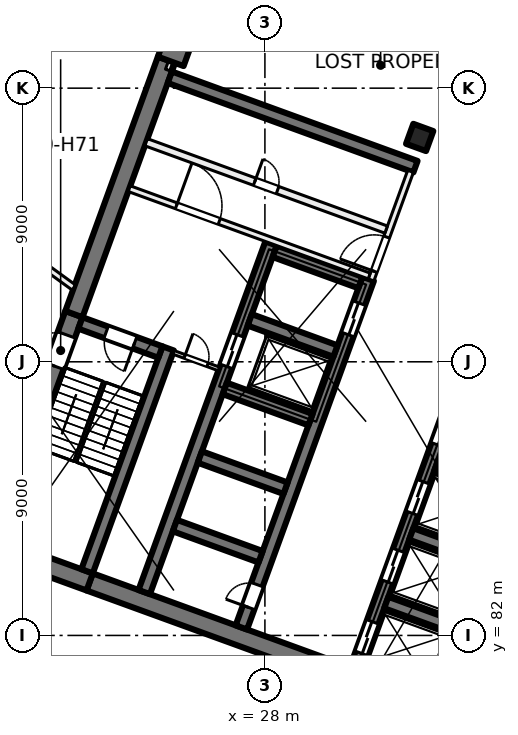
"""IFC4 building model, lengths in metres.
Left out: names, types, materials, properties, quantities, classifications, styles, units other than length and angle.
Written with IfcOpenShell. Run it as: python <this file> out.ifc"""

import sys

from ifc_helpers import new_model, si_unit, direction, frame, frame_2d, origin, origin_2d, place, context, subcontext, project, spatial, rectangle, extrude, element, fill, save


model = new_model("IFC4")
c1 = context("Model", 3, precision=1e-05, world=origin(), true_north=direction((0.0, 1.0)))
c2 = subcontext(c1, "Body", "Model", "MODEL_VIEW")
j1 = project(units=[si_unit("LENGTHUNIT", "METRE"), si_unit("PLANEANGLEUNIT", "RADIAN")], contexts=[c1])
p1 = place(None, origin())
s1 = spatial("IfcSite", under=j1, at=p1, CompositionType="ELEMENT")
p2 = place(p1, origin())
s2 = spatial("IfcBuilding", under=s1, at=p2, CompositionType="ELEMENT")
p3 = place(p2, origin())
s3 = spatial("IfcBuildingStorey", under=s2, at=p3, CompositionType="ELEMENT", Elevation=0.0)
p4 = place(p3, frame((33.091, 98.379, 0.0), z_axis=(0.0, 0.0, 1.0), x_axis=(-0.342020143326, -0.939692620786, 0.0)))
e1 = element("IfcColumn", 1, at=p4, inside=s3, PredefinedType="COLUMN", context=c2, shape_type="SweptSolid", body=[
    extrude(rectangle(XDim=0.7, YDim=0.7, at=origin_2d()), origin(), (0.0, 0.0, 1.0), 7.5),
])
p5 = place(p3, frame((25.056, 101.303, 0.0), z_axis=(0.0, 0.0, 1.0), x_axis=(-0.342020143326, -0.939692620786, 0.0)))
e2 = element("IfcColumn", 2, at=p5, inside=s3, PredefinedType="COLUMN", context=c2, shape_type="SweptSolid", body=[
    extrude(rectangle(XDim=0.9, YDim=0.9, at=origin_2d()), origin(), (0.0, 0.0, 1.0), 7.5),
])
p6 = place(p3, frame((35.767, 78.835, 0.0), z_axis=(0.0, 0.0, 1.0), x_axis=(-0.939692894512, 0.342019391267, 0.0)))
e3 = element("IfcWall", 3, at=p6, inside=s3, PredefinedType="SHEAR", context=c2, shape_type="SweptSolid", body=[
    extrude(rectangle(XDim=14.4, YDim=0.6, at=frame_2d((7.2, 0.0))), origin(), (0.0, 0.0, 1.0), 7.5),
])
p7 = place(p3, frame((22.236, 83.76, 0.0), z_axis=(0.0, 0.0, 1.0), x_axis=(-0.939680822529, 0.342052557032, 0.0)))
e4 = element("IfcWall", 4, at=p7, inside=s3, PredefinedType="SHEAR", context=c2, shape_type="SweptSolid", body=[
    extrude(rectangle(XDim=3.8, YDim=0.6, at=frame_2d((1.9, 0.0))), origin(), (0.0, 0.0, 1.0), 7.5),
])
p8 = place(p3, frame((19.05, 85.239, 0.0), z_axis=(0.0, 0.0, 1.0), x_axis=(0.342016982193, 0.939693771338, 0.0)))
e5 = element("IfcWall", 5, at=p8, inside=s3, PredefinedType="SHEAR", context=c2, shape_type="SweptSolid", body=[
    extrude(rectangle(XDim=7.8, YDim=0.6, at=frame_2d((3.9, 0.0))), origin(), (0.0, 0.0, 1.0), 7.5),
])
p9 = place(p8, frame((5.975, 0.0, 0.0)))
e6 = element("IfcOpeningElement", 6, at=p9, cuts=e5, PredefinedType="OPENING", context=c2, shape_type="SweptSolid", body=[
    extrude(rectangle(XDim=1.1, YDim=2.1, at=frame_2d((0.55, 1.05))), frame((0.0, 0.31, 0.0), z_axis=(0.0, -1.0, 0.0), x_axis=(1.0, 0.0, 0.0)), (0.0, 0.0, 1.0), 0.62),
])
p10 = place(p3, frame((21.717, 92.568, 0.0), z_axis=(0.0, 0.0, 1.0), x_axis=(0.342016162452, 0.939694069696, 0.0)))
e7 = element("IfcWall", 7, at=p10, inside=s3, PredefinedType="SHEAR", context=c2, shape_type="SweptSolid", body=[
    extrude(rectangle(XDim=8.9, YDim=0.6, at=frame_2d((4.45, 0.0))), origin(), (0.0, 0.0, 1.0), 7.5),
])
p11 = place(p3, frame((22.15, 84.11, 0.0), z_axis=(0.0, 0.0, 1.0), x_axis=(0.342016982193, 0.939693771338, 0.0)))
e8 = element("IfcWall", 8, at=p11, inside=s3, PredefinedType="SHEAR", context=c2, shape_type="SweptSolid", body=[
    extrude(rectangle(XDim=7.8, YDim=0.4, at=frame_2d((3.9, 0.0))), origin(), (0.0, 0.0, 1.0), 7.5),
])
p12 = place(p3, frame((24.562, 91.32, 0.0), z_axis=(0.0, 0.0, 1.0), x_axis=(-0.939717030584, 0.341953070509, 0.0)))
e9 = element("IfcWall", 9, at=p12, inside=s3, PredefinedType="SHEAR", context=c2, shape_type="SweptSolid", body=[
    extrude(rectangle(XDim=2.8, YDim=0.4, at=frame_2d((1.4, 0.0))), origin(), (0.0, 0.0, 1.0), 7.5),
])
p13 = place(p12, frame((0.9, 0.0, 0.0)))
e10 = element("IfcOpeningElement", 10, at=p13, cuts=e9, PredefinedType="OPENING", context=c2, shape_type="SweptSolid", body=[
    extrude(rectangle(XDim=1.0, YDim=2.1, at=frame_2d((0.5, 1.05))), frame((0.0, 0.21, 0.0), z_axis=(0.0, -1.0, 0.0), x_axis=(1.0, 0.0, 0.0)), (0.0, 0.0, 1.0), 0.42),
])
p14 = place(p3, frame((30.984, 80.895, 0.0), z_axis=(0.0, 0.0, 1.0), x_axis=(0.342021021735, 0.939692301071, 0.0)))
e11 = element("IfcWall", 11, at=p14, inside=s3, PredefinedType="SHEAR", context=c2, shape_type="SweptSolid", body=[
    extrude(rectangle(XDim=12.2, YDim=0.4, at=frame_2d((6.1, 0.0))), origin(), (0.0, 0.0, 1.0), 7.5),
])
p15 = place(p14, frame((0.55, 0.0, 0.0)))
e12 = element("IfcOpeningElement", 12, at=p15, cuts=e11, PredefinedType="OPENING", context=c2, shape_type="SweptSolid", body=[
    extrude(rectangle(XDim=1.1, YDim=2.1, at=frame_2d((0.55, 1.05))), frame((0.0, 0.21, 0.0), z_axis=(0.0, -1.0, 0.0), x_axis=(1.0, 0.0, 0.0)), (0.0, 0.0, 1.0), 0.42),
])
p16 = place(p14, frame((3.05, 0.0, 0.0)))
e13 = element("IfcOpeningElement", 13, at=p16, cuts=e11, PredefinedType="OPENING", context=c2, shape_type="SweptSolid", body=[
    extrude(rectangle(XDim=1.1, YDim=2.1, at=frame_2d((0.55, 1.05))), frame((0.0, 0.21, 0.0), z_axis=(0.0, -1.0, 0.0), x_axis=(1.0, 0.0, 0.0)), (0.0, 0.0, 1.0), 0.42),
])
p17 = place(p14, frame((5.45, 0.0, 0.0)))
e14 = element("IfcOpeningElement", 14, at=p17, cuts=e11, PredefinedType="OPENING", context=c2, shape_type="SweptSolid", body=[
    extrude(rectangle(XDim=1.1, YDim=2.1, at=frame_2d((0.55, 1.05))), frame((0.0, 0.21, 0.0), z_axis=(0.0, -1.0, 0.0), x_axis=(1.0, 0.0, 0.0)), (0.0, 0.0, 1.0), 0.42),
])
p18 = place(p14, frame((7.85, 0.0, 0.0)))
e15 = element("IfcOpeningElement", 15, at=p18, cuts=e11, PredefinedType="OPENING", context=c2, shape_type="SweptSolid", body=[
    extrude(rectangle(XDim=1.1, YDim=2.1, at=frame_2d((0.55, 1.05))), frame((0.0, 0.21, 0.0), z_axis=(0.0, -1.0, 0.0), x_axis=(1.0, 0.0, 0.0)), (0.0, 0.0, 1.0), 0.42),
])
p19 = place(p14, frame((10.25, 0.0, 0.0)))
e16 = element("IfcOpeningElement", 16, at=p19, cuts=e11, PredefinedType="OPENING", context=c2, shape_type="SweptSolid", body=[
    extrude(rectangle(XDim=1.1, YDim=2.1, at=frame_2d((0.55, 1.05))), frame((0.0, 0.21, 0.0), z_axis=(0.0, -1.0, 0.0), x_axis=(1.0, 0.0, 0.0)), (0.0, 0.0, 1.0), 0.42),
])
for number, where, z_axis, x_axis in (
    (17, (34.812, 82.056, 0.0), (0.0, 0.0, 1.0), (-0.94, 0.342, 0.0)),
    (18, (35.632, 84.311, 0.0), (0.0, 0.0, 1.0), (-0.94, 0.342, 0.0)),
    (19, (36.453, 86.566, 0.0), (0.0, 0.0, 1.0), (-0.94, 0.342, 0.0)),
):
    element("IfcWall", number, at=place(p3, frame(where, z_axis=z_axis, x_axis=x_axis)), inside=s3, PredefinedType="SHEAR", context=c2, shape_type="SweptSolid", body=[
        extrude(rectangle(XDim=3.0, YDim=0.4, at=frame_2d((1.5, 0.0))), origin(), (0.0, 0.0, 1.0), 7.5),
    ])
p20 = place(p3, frame((27.225, 82.263, 0.0), z_axis=(0.0, 0.0, 1.0), x_axis=(0.342014590177, 0.939694641948, 0.0)))
e20 = element("IfcWall", 20, at=p20, inside=s3, PredefinedType="SHEAR", context=c2, shape_type="SweptSolid", body=[
    extrude(rectangle(XDim=12.2, YDim=0.4, at=frame_2d((6.1, 0.0))), origin(), (0.0, 0.0, 1.0), 7.5),
])
p21 = place(p20, frame((10.25, 0.0, 0.0)))
e21 = element("IfcOpeningElement", 21, at=p21, cuts=e20, PredefinedType="OPENING", context=c2, shape_type="SweptSolid", body=[
    extrude(rectangle(XDim=1.1, YDim=2.1, at=frame_2d((0.55, 1.05))), frame((0.0, 0.21, 0.0), z_axis=(0.0, -1.0, 0.0), x_axis=(1.0, 0.0, 0.0)), (0.0, 0.0, 1.0), 0.42),
])
p22 = place(p20, frame((0.7, 0.0, 0.0)))
e22 = element("IfcOpeningElement", 22, at=p22, cuts=e20, PredefinedType="OPENING", context=c2, shape_type="SweptSolid", body=[
    extrude(rectangle(XDim=0.8, YDim=2.1, at=frame_2d((0.4, 1.05))), frame((0.0, 0.21, 0.0), z_axis=(0.0, -1.0, 0.0), x_axis=(1.0, 0.0, 0.0)), (0.0, 0.0, 1.0), 0.42),
])
p23 = place(p3, frame((24.03, 83.426, 0.0), z_axis=(0.0, 0.0, 1.0), x_axis=(0.342014590177, 0.939694641948, 0.0)))
e23 = element("IfcWall", 23, at=p23, inside=s3, PredefinedType="SHEAR", context=c2, shape_type="SweptSolid", body=[
    extrude(rectangle(XDim=12.2, YDim=0.4, at=frame_2d((6.1, 0.0))), origin(), (0.0, 0.0, 1.0), 7.5),
])
p24 = place(p23, frame((7.9, 0.0, 0.0)))
e24 = element("IfcOpeningElement", 24, at=p24, cuts=e23, PredefinedType="OPENING", context=c2, shape_type="SweptSolid", body=[
    extrude(rectangle(XDim=1.1, YDim=2.1, at=frame_2d((0.55, 1.05))), frame((0.0, 0.21, 0.0), z_axis=(0.0, -1.0, 0.0), x_axis=(1.0, 0.0, 0.0)), (0.0, 0.0, 1.0), 0.42),
])
p25 = place(p3, frame((27.858, 84.587, 0.0), z_axis=(0.0, 0.0, 1.0), x_axis=(-0.939686455819, 0.342037080957, 0.0)))
e25 = element("IfcWall", 25, at=p25, inside=s3, PredefinedType="SHEAR", context=c2, shape_type="SweptSolid", body=[
    extrude(rectangle(XDim=3.0, YDim=0.4, at=frame_2d((1.5, 0.0))), origin(), (0.0, 0.0, 1.0), 7.5),
])
p26 = place(p3, frame((28.678, 86.842, 0.0), z_axis=(0.0, 0.0, 1.0), x_axis=(-0.939676934218, 0.342063238742, 0.0)))
e26 = element("IfcWall", 26, at=p26, inside=s3, PredefinedType="SHEAR", context=c2, shape_type="SweptSolid", body=[
    extrude(rectangle(XDim=3.0, YDim=0.4, at=frame_2d((1.5, 0.0))), origin(), (0.0, 0.0, 1.0), 7.5),
])
for number, where, z_axis, x_axis in (
    (27, (29.5, 89.097, 0.0), (0.0, 0.0, 1.0), (-0.94, 0.342, 0.0)),
    (28, (30.32, 91.353, 0.0), (0.0, 0.0, 1.0), (-0.94, 0.342, 0.0)),
    (29, (31.141, 93.608, 0.0), (0.0, 0.0, 1.0), (-0.94, 0.342, 0.0)),
):
    element("IfcWall", number, at=place(p3, frame(where, z_axis=z_axis, x_axis=x_axis)), inside=s3, PredefinedType="SHEAR", context=c2, shape_type="SweptSolid", body=[
        extrude(rectangle(XDim=3.0, YDim=0.4, at=frame_2d((1.5, 0.0))), origin(), (0.0, 0.0, 1.0), 7.5),
    ])
p27 = place(p3, frame((32.953, 97.418, 0.0), z_axis=(0.0, 0.0, 1.0), x_axis=(-0.93969060187, 0.342025690201, 0.0)))
e30 = element("IfcWall", 30, at=p27, inside=s3, PredefinedType="SHEAR", context=c2, shape_type="SweptSolid", body=[
    extrude(rectangle(XDim=8.6, YDim=0.4, at=frame_2d((4.3, 0.0))), origin(), (0.0, 0.0, 1.0), 7.5),
])
p28 = place(p3, frame((12.199, 89.809, 0.0), z_axis=(0.0, 0.0, 1.0), x_axis=(0.342022998908, 0.939691581434, 0.0)))
e31 = element("IfcWall", 31, at=p28, inside=s3, PredefinedType="SOLIDWALL", context=c2, shape_type="SweptSolid", body=[
    extrude(rectangle(XDim=47.334, YDim=0.6, at=frame_2d((23.667, 0.0))), origin(), (0.0, 0.0, 1.0), 7.1),
])
p29 = place(p28, frame((1.523, 0.0, 0.0)))
e32 = element("IfcOpeningElement", 32, at=p29, cuts=e31, PredefinedType="OPENING", context=c2, shape_type="SweptSolid", body=[
    extrude(rectangle(XDim=1.2, YDim=2.4, at=frame_2d((0.6, 1.2))), frame((0.0, 0.31, 0.0), z_axis=(0.0, -1.0, 0.0), x_axis=(1.0, 0.0, 0.0)), (0.0, 0.0, 1.0), 0.62),
])
p30 = place(p28, frame((5.829, 0.0, 0.0)))
e33 = element("IfcOpeningElement", 33, at=p30, cuts=e31, PredefinedType="OPENING", context=c2, shape_type="SweptSolid", body=[
    extrude(rectangle(XDim=1.2, YDim=2.4, at=frame_2d((0.6, 1.2))), frame((0.0, 0.31, 0.0), z_axis=(0.0, -1.0, 0.0), x_axis=(1.0, 0.0, 0.0)), (0.0, 0.0, 1.0), 0.62),
])
p31 = place(p28, frame((9.235, 0.0, 0.9)))
e34 = element("IfcOpeningElement", 34, at=p31, cuts=e31, PredefinedType="OPENING", context=c2, shape_type="SweptSolid", body=[
    extrude(rectangle(XDim=3.0, YDim=4.2, at=frame_2d((1.5, 2.1))), frame((0.0, 0.31, 0.0), z_axis=(0.0, -1.0, 0.0), x_axis=(1.0, 0.0, 0.0)), (0.0, 0.0, 1.0), 0.62),
])
p32 = place(p28, frame((13.99, 0.0, 0.9)))
e35 = element("IfcOpeningElement", 35, at=p32, cuts=e31, PredefinedType="OPENING", context=c2, shape_type="SweptSolid", body=[
    extrude(rectangle(XDim=3.0, YDim=4.2, at=frame_2d((1.5, 2.1))), frame((0.0, 0.31, 0.0), z_axis=(0.0, -1.0, 0.0), x_axis=(1.0, 0.0, 0.0)), (0.0, 0.0, 1.0), 0.62),
])
p33 = place(p28, frame((17.846, 0.0, 0.9)))
e36 = element("IfcOpeningElement", 36, at=p33, cuts=e31, PredefinedType="OPENING", context=c2, shape_type="SweptSolid", body=[
    extrude(rectangle(XDim=3.0, YDim=4.2, at=frame_2d((1.5, 2.1))), frame((0.0, 0.31, 0.0), z_axis=(0.0, -1.0, 0.0), x_axis=(1.0, 0.0, 0.0)), (0.0, 0.0, 1.0), 0.62),
])
p34 = place(p28, frame((22.452, 0.0, 0.9)))
e37 = element("IfcOpeningElement", 37, at=p34, cuts=e31, PredefinedType="OPENING", context=c2, shape_type="SweptSolid", body=[
    extrude(rectangle(XDim=3.0, YDim=4.2, at=frame_2d((1.5, 2.1))), frame((0.0, 0.31, 0.0), z_axis=(0.0, -1.0, 0.0), x_axis=(1.0, 0.0, 0.0)), (0.0, 0.0, 1.0), 0.62),
])
p35 = place(p28, frame((26.458, 0.0, 0.9)))
e38 = element("IfcOpeningElement", 38, at=p35, cuts=e31, PredefinedType="OPENING", context=c2, shape_type="SweptSolid", body=[
    extrude(rectangle(XDim=3.0, YDim=4.2, at=frame_2d((1.5, 2.1))), frame((0.0, 0.31, 0.0), z_axis=(0.0, -1.0, 0.0), x_axis=(1.0, 0.0, 0.0)), (0.0, 0.0, 1.0), 0.62),
])
p36 = place(p28, frame((31.064, 0.0, 0.9)))
e39 = element("IfcOpeningElement", 39, at=p36, cuts=e31, PredefinedType="OPENING", context=c2, shape_type="SweptSolid", body=[
    extrude(rectangle(XDim=3.0, YDim=4.2, at=frame_2d((1.5, 2.1))), frame((0.0, 0.31, 0.0), z_axis=(0.0, -1.0, 0.0), x_axis=(1.0, 0.0, 0.0)), (0.0, 0.0, 1.0), 0.62),
])
p37 = place(p28, frame((36.029, 0.0, 0.9)))
e40 = element("IfcOpeningElement", 40, at=p37, cuts=e31, PredefinedType="OPENING", context=c2, shape_type="SweptSolid", body=[
    extrude(rectangle(XDim=1.2, YDim=4.2, at=frame_2d((0.6, 2.1))), frame((0.0, 0.31, 0.0), z_axis=(0.0, -1.0, 0.0), x_axis=(1.0, 0.0, 0.0)), (0.0, 0.0, 1.0), 0.62),
])
p38 = place(p28, frame((39.676, 0.0, 0.9)))
e41 = element("IfcOpeningElement", 41, at=p38, cuts=e31, PredefinedType="OPENING", context=c2, shape_type="SweptSolid", body=[
    extrude(rectangle(XDim=3.0, YDim=4.2, at=frame_2d((1.5, 2.1))), frame((0.0, 0.31, 0.0), z_axis=(0.0, -1.0, 0.0), x_axis=(1.0, 0.0, 0.0)), (0.0, 0.0, 1.0), 0.62),
])
p39 = place(p28, frame((43.531, 0.0, 0.9)))
e42 = element("IfcOpeningElement", 42, at=p39, cuts=e31, PredefinedType="OPENING", context=c2, shape_type="SweptSolid", body=[
    extrude(rectangle(XDim=3.0, YDim=4.2, at=frame_2d((1.5, 2.1))), frame((0.0, 0.31, 0.0), z_axis=(0.0, -1.0, 0.0), x_axis=(1.0, 0.0, 0.0)), (0.0, 0.0, 1.0), 0.62),
])
p40 = place(p3, frame((31.491, 93.693, 0.0), z_axis=(0.0, 0.0, 1.0), x_axis=(0.341995824804, 0.939701471648, 0.0)))
e43 = element("IfcWall", 43, at=p40, inside=s3, PredefinedType="PARTITIONING", context=c2, shape_type="SweptSolid", body=[
    extrude(rectangle(XDim=3.8, YDim=0.2, at=frame_2d((1.9, 0.0))), origin(), (0.0, 0.0, 1.0), 7.1),
])
p41 = place(p40, frame((0.3, 0.0, 0.0)))
e44 = element("IfcOpeningElement", 44, at=p41, cuts=e43, PredefinedType="OPENING", context=c2, shape_type="SweptSolid", body=[
    extrude(rectangle(XDim=1.2, YDim=2.1, at=frame_2d((0.6, 1.05))), frame((0.0, 0.11, 0.0), z_axis=(0.0, -1.0, 0.0), x_axis=(1.0, 0.0, 0.0)), (0.0, 0.0, 1.0), 0.22),
])
p42 = place(p3, frame((23.538, 96.694, 0.0), z_axis=(0.0, 0.0, 1.0), x_axis=(0.939691552312, -0.342023078919, 0.0)))
e45 = element("IfcWall", 45, at=p42, inside=s3, PredefinedType="PARTITIONING", context=c2, shape_type="SweptSolid", body=[
    extrude(rectangle(XDim=8.4, YDim=0.2, at=frame_2d((4.2, 0.0))), origin(), (0.0, 0.0, 1.0), 7.1),
])
p43 = place(p42, frame((1.65, 0.0, 0.0)))
e46 = element("IfcOpeningElement", 46, at=p43, cuts=e45, PredefinedType="OPENING", context=c2, shape_type="SweptSolid", body=[
    extrude(rectangle(XDim=1.5, YDim=2.1, at=frame_2d((0.75, 1.05))), frame((0.0, 0.11, 0.0), z_axis=(0.0, -1.0, 0.0), x_axis=(1.0, 0.0, 0.0)), (0.0, 0.0, 1.0), 0.22),
])
p44 = place(p3, frame((24.094, 98.221, 0.0), z_axis=(0.0, 0.0, 1.0), x_axis=(0.939691552312, -0.342023078919, 0.0)))
e47 = element("IfcWall", 47, at=p44, inside=s3, PredefinedType="PARTITIONING", context=c2, shape_type="SweptSolid", body=[
    extrude(rectangle(XDim=8.4, YDim=0.25, at=frame_2d((4.2, 0.0))), origin(), (0.0, 0.0, 1.0), 7.1),
])
p45 = place(p44, frame((3.8, 0.0, 0.0)))
e48 = element("IfcOpeningElement", 48, at=p45, cuts=e47, PredefinedType="OPENING", context=c2, shape_type="SweptSolid", body=[
    extrude(rectangle(XDim=0.8, YDim=2.1, at=frame_2d((0.4, 1.05))), frame((0.0, 0.135, 0.0), z_axis=(0.0, -1.0, 0.0), x_axis=(1.0, 0.0, 0.0)), (0.0, 0.0, 1.0), 0.27),
])
p46 = place(p3, frame((24.985, 91.312, 0.0), z_axis=(0.0, 0.0, 1.0), x_axis=(0.939708740826, -0.341975850632, 0.0)))
e49 = element("IfcWall", 49, at=p46, inside=s3, PredefinedType="PARTITIONING", context=c2, shape_type="SweptSolid", body=[
    extrude(rectangle(XDim=1.6, YDim=0.125, at=frame_2d((0.8, 0.0))), origin(), (0.0, 0.0, 1.0), 7.1),
])
p47 = place(p46, frame((0.4, 0.0, 0.0)))
e50 = element("IfcOpeningElement", 50, at=p47, cuts=e49, PredefinedType="OPENING", context=c2, shape_type="SweptSolid", body=[
    extrude(rectangle(XDim=0.8, YDim=2.1, at=frame_2d((0.4, 1.05))), frame((0.0, 0.073, 0.0), z_axis=(0.0, -1.0, 0.0), x_axis=(1.0, 0.0, 0.0)), (0.0, 0.0, 1.0), 0.145),
])
p48 = place(p3, frame((15.488, 97.968, 0.0), z_axis=(0.0, 0.0, 1.0), x_axis=(0.809018500784, -0.587783178892, 0.0)))
e51 = element("IfcWall", 51, at=p48, inside=s3, PredefinedType="PARTITIONING", context=c2, shape_type="SweptSolid", body=[
    extrude(rectangle(XDim=7.698, YDim=0.2, at=frame_2d((3.849, 0.0))), origin(), (0.0, 0.0, 1.0), 7.1),
])
p49 = place(p3, frame((24.8, 100.598, 0.0), z_axis=(0.0, 0.0, 1.0), x_axis=(0.341943433621, 0.93972053729, 0.0)))
e52 = element("IfcWall", 52, at=p49, inside=s3, PredefinedType="PARTITIONING", context=c2, shape_type="SweptSolid", body=[
    extrude(rectangle(XDim=11.25, YDim=0.15, at=frame_2d((5.625, 0.0))), origin(), (0.0, 0.0, 1.0), 7.1),
])
p50 = place(p21, origin())
e53 = element("IfcDoor", 53, at=p50, inside=s3, OperationType="DOUBLE_DOOR_SLIDING", PredefinedType="DOOR", context=c2, shape_type="SweptSolid", body=[
    extrude(rectangle(XDim=1.1, YDim=2.1, at=frame_2d((0.55, 1.05))), frame((0.0, 0.025, 0.0), z_axis=(0.0, -1.0, 0.0), x_axis=(1.0, 0.0, 0.0)), (0.0, 0.0, 1.0), 0.05),
])
fill(e21, e53)
p51 = place(p15, origin())
e54 = element("IfcDoor", 54, at=p51, inside=s3, OperationType="DOUBLE_DOOR_SLIDING", PredefinedType="DOOR", context=c2, shape_type="SweptSolid", body=[
    extrude(rectangle(XDim=1.1, YDim=2.1, at=frame_2d((0.55, 1.05))), frame((0.0, 0.025, 0.0), z_axis=(0.0, -1.0, 0.0), x_axis=(1.0, 0.0, 0.0)), (0.0, 0.0, 1.0), 0.05),
])
fill(e12, e54)
p52 = place(p16, origin())
e55 = element("IfcDoor", 55, at=p52, inside=s3, OperationType="DOUBLE_DOOR_SLIDING", PredefinedType="DOOR", context=c2, shape_type="SweptSolid", body=[
    extrude(rectangle(XDim=1.1, YDim=2.1, at=frame_2d((0.55, 1.05))), frame((0.0, 0.025, 0.0), z_axis=(0.0, -1.0, 0.0), x_axis=(1.0, 0.0, 0.0)), (0.0, 0.0, 1.0), 0.05),
])
fill(e13, e55)
p53 = place(p17, origin())
e56 = element("IfcDoor", 56, at=p53, inside=s3, OperationType="DOUBLE_DOOR_SLIDING", PredefinedType="DOOR", context=c2, shape_type="SweptSolid", body=[
    extrude(rectangle(XDim=1.1, YDim=2.1, at=frame_2d((0.55, 1.05))), frame((0.0, 0.025, 0.0), z_axis=(0.0, -1.0, 0.0), x_axis=(1.0, 0.0, 0.0)), (0.0, 0.0, 1.0), 0.05),
])
fill(e14, e56)
p54 = place(p18, origin())
e57 = element("IfcDoor", 57, at=p54, inside=s3, OperationType="DOUBLE_DOOR_SLIDING", PredefinedType="DOOR", context=c2, shape_type="SweptSolid", body=[
    extrude(rectangle(XDim=1.1, YDim=2.1, at=frame_2d((0.55, 1.05))), frame((0.0, 0.025, 0.0), z_axis=(0.0, -1.0, 0.0), x_axis=(1.0, 0.0, 0.0)), (0.0, 0.0, 1.0), 0.05),
])
fill(e15, e57)
p55 = place(p22, origin())
e58 = element("IfcDoor", 58, at=p55, inside=s3, OperationType="SINGLE_SWING_LEFT", PredefinedType="DOOR", context=c2, shape_type="SweptSolid", body=[
    extrude(rectangle(XDim=0.8, YDim=2.1, at=frame_2d((0.4, 1.05))), frame((0.0, 0.025, 0.0), z_axis=(0.0, -1.0, 0.0), x_axis=(1.0, 0.0, 0.0)), (0.0, 0.0, 1.0), 0.05),
])
fill(e22, e58)
p56 = place(p41, origin())
e59 = element("IfcDoor", 59, at=p56, inside=s3, OperationType="DOUBLE_DOOR_SINGLE_SWING", PredefinedType="DOOR", context=c2, shape_type="SweptSolid", body=[
    extrude(rectangle(XDim=1.2, YDim=2.1, at=frame_2d((0.6, 1.05))), frame((0.0, 0.025, 0.0), z_axis=(0.0, -1.0, 0.0), x_axis=(1.0, 0.0, 0.0)), (0.0, 0.0, 1.0), 0.05),
])
fill(e44, e59)
p57 = place(p43, origin())
e60 = element("IfcDoor", 60, at=p57, inside=s3, OperationType="DOUBLE_DOOR_SINGLE_SWING", PredefinedType="DOOR", context=c2, shape_type="SweptSolid", body=[
    extrude(rectangle(XDim=1.5, YDim=2.1, at=frame_2d((0.75, 1.05))), frame((0.0, 0.025, 0.0), z_axis=(0.0, -1.0, 0.0), x_axis=(1.0, 0.0, 0.0)), (0.0, 0.0, 1.0), 0.05),
])
fill(e46, e60)
p58 = place(p13, origin())
e61 = element("IfcDoor", 61, at=p58, inside=s3, OperationType="SINGLE_SWING_LEFT", PredefinedType="DOOR", context=c2, shape_type="SweptSolid", body=[
    extrude(rectangle(XDim=1.0, YDim=2.1, at=frame_2d((0.5, 1.05))), frame((0.0, 0.025, 0.0), z_axis=(0.0, -1.0, 0.0), x_axis=(1.0, 0.0, 0.0)), (0.0, 0.0, 1.0), 0.05),
])
fill(e10, e61)
p59 = place(p47, origin())
e62 = element("IfcDoor", 62, at=p59, inside=s3, OperationType="SINGLE_SWING_RIGHT", PredefinedType="DOOR", context=c2, shape_type="SweptSolid", body=[
    extrude(rectangle(XDim=0.8, YDim=2.1, at=frame_2d((0.4, 1.05))), frame((0.0, 0.025, 0.0), z_axis=(0.0, -1.0, 0.0), x_axis=(1.0, 0.0, 0.0)), (0.0, 0.0, 1.0), 0.05),
])
fill(e50, e62)
p60 = place(p45, origin())
e63 = element("IfcDoor", 63, at=p60, inside=s3, OperationType="SINGLE_SWING_LEFT", PredefinedType="DOOR", context=c2, shape_type="SweptSolid", body=[
    extrude(rectangle(XDim=0.8, YDim=2.1, at=frame_2d((0.4, 1.05))), frame((0.0, 0.025, 0.0), z_axis=(0.0, -1.0, 0.0), x_axis=(1.0, 0.0, 0.0)), (0.0, 0.0, 1.0), 0.05),
])
fill(e48, e63)
p61 = place(p24, origin())
e64 = element("IfcDoor", 64, at=p61, inside=s3, OperationType="DOUBLE_DOOR_SLIDING", PredefinedType="DOOR", context=c2, shape_type="SweptSolid", body=[
    extrude(rectangle(XDim=1.1, YDim=2.1, at=frame_2d((0.55, 1.05))), frame((0.0, 0.025, 0.0), z_axis=(0.0, -1.0, 0.0), x_axis=(1.0, 0.0, 0.0)), (0.0, 0.0, 1.0), 0.05),
])
fill(e24, e64)
p62 = place(p9, origin())
e65 = element("IfcDoor", 65, at=p62, inside=s3, OperationType="SINGLE_SWING_LEFT", PredefinedType="DOOR", context=c2, shape_type="SweptSolid", body=[
    extrude(rectangle(XDim=1.1, YDim=2.1, at=frame_2d((0.55, 1.05))), frame((0.0, 0.025, 0.0), z_axis=(0.0, -1.0, 0.0), x_axis=(1.0, 0.0, 0.0)), (0.0, 0.0, 1.0), 0.05),
])
fill(e6, e65)
save(model, sys.argv[1])
